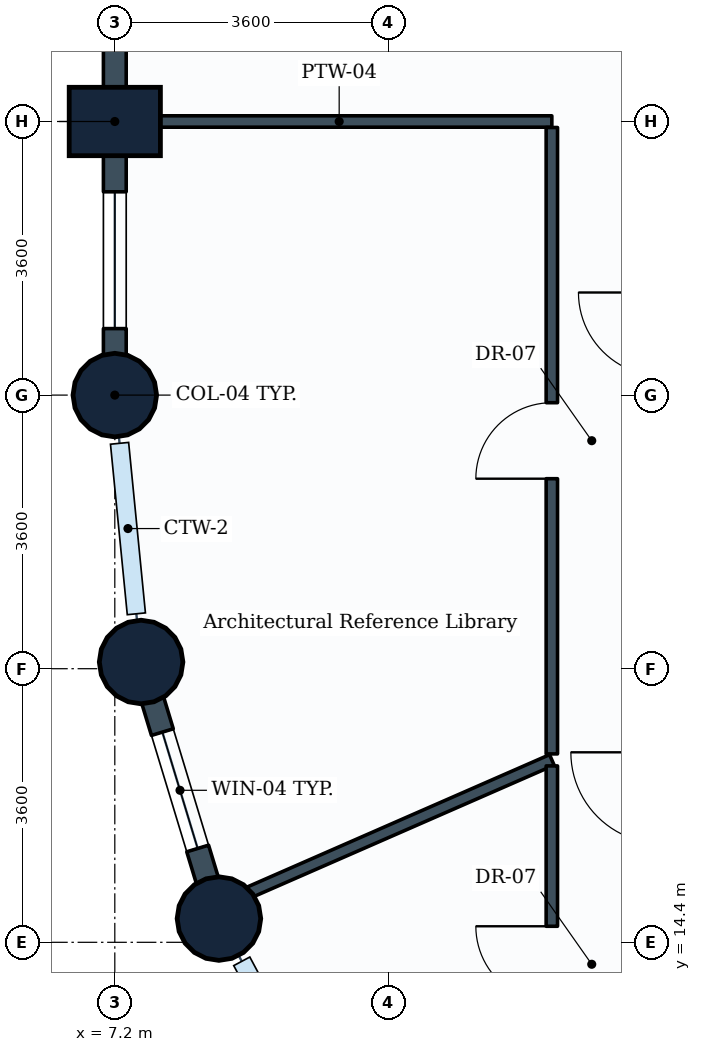
"""IFC4 building model, lengths in metres.
Left out: names, types, materials, properties, quantities, classifications, styles, units other than length and angle.
Written with IfcOpenShell. Run it as: python <this file> out.ifc"""

import sys

from ifc_helpers import new_model, si_unit, direction, frame, frame_2d, origin, origin_2d, place, context, subcontext, project, spatial, rectangle, circle, extrude, element, fill, save


model = new_model("IFC4")
c1 = context("Model", 3, precision=1e-05, world=origin(), true_north=direction((0.0, 1.0)))
c2 = subcontext(c1, "Body", "Model", "MODEL_VIEW")
j1 = project(units=[si_unit("LENGTHUNIT", "METRE"), si_unit("PLANEANGLEUNIT", "RADIAN")], contexts=[c1])
p1 = place(None, origin())
s1 = spatial("IfcSite", under=j1, at=p1, CompositionType="ELEMENT")
p2 = place(p1, origin())
s2 = spatial("IfcBuilding", under=s1, at=p2, CompositionType="ELEMENT")
p3 = place(p2, frame((0.0, 0.0, 39.6)))
s3 = spatial("IfcBuildingStorey", under=s2, at=p3, CompositionType="ELEMENT", Elevation=39.6)
p4 = place(p3, frame((7.2, 21.6, 0.0), z_axis=(0.0, 0.0, 1.0), x_axis=(1.0, 0.0, 0.0)))
e1 = element("IfcColumn", 1, at=p4, inside=s3, PredefinedType="COLUMN", context=c2, shape_type="SweptSolid", body=[
    extrude(circle(Radius=0.55, at=origin_2d()), origin(), (0.0, 0.0, 1.0), 3.9),
])
p5 = place(p3, frame((7.2, 25.2, 0.0), z_axis=(0.0, 0.0, 1.0), x_axis=(0.0, 1.0, 0.0)))
e2 = element("IfcColumn", 2, at=p5, inside=s3, PredefinedType="COLUMN", context=c2, shape_type="SweptSolid", body=[
    extrude(rectangle(XDim=0.9, YDim=1.2, at=origin_2d()), origin(), (0.0, 0.0, 1.0), 3.9),
])
for number, where, z_axis, x_axis in (
    (3, (7.546, 18.088, 0.0), (0.0, 0.0, 1.0), (1.0, 0.0, 0.0)),
    (4, (8.57, 14.712, 0.0), (0.0, 0.0, 1.0), (1.0, 0.0, 0.0)),
):
    element("IfcColumn", number, at=place(p3, frame(where, z_axis=z_axis, x_axis=x_axis)), inside=s3, PredefinedType="COLUMN", context=c2, shape_type="SweptSolid", body=[
        extrude(circle(Radius=0.55, at=origin_2d()), origin(), (0.0, 0.0, 1.0), 3.9),
    ])
p6 = place(p3, frame((7.2, 25.2, 0.0), z_axis=(0.0, 0.0, 1.0), x_axis=(0.0, 1.0, 0.0)))
e5 = element("IfcWall", 5, at=p6, inside=s3, PredefinedType="STANDARD", context=c2, shape_type="SweptSolid", body=[
    extrude(rectangle(XDim=3.6, YDim=0.3, at=frame_2d((1.8, 0.0))), origin(), (0.0, 0.0, 1.0), 2.93),
])
p7 = place(p3, frame((7.2, 21.6, 0.0), z_axis=(0.0, 0.0, 1.0), x_axis=(0.0, 1.0, 0.0)))
e6 = element("IfcWall", 6, at=p7, inside=s3, PredefinedType="STANDARD", context=c2, shape_type="SweptSolid", body=[
    extrude(rectangle(XDim=3.6, YDim=0.3, at=frame_2d((1.8, 0.0))), origin(), (0.0, 0.0, 1.0), 2.93),
])
p8 = place(p7, frame((0.875, 0.0, 0.85)))
e7 = element("IfcOpeningElement", 7, at=p8, cuts=e6, PredefinedType="OPENING", context=c2, shape_type="SweptSolid", body=[
    extrude(rectangle(XDim=1.8, YDim=1.35, at=frame_2d((0.9, 0.675))), frame((0.0, 0.16, 0.0), z_axis=(0.0, -1.0, 0.0), x_axis=(1.0, 0.0, 0.0)), (0.0, 0.0, 1.0), 0.32),
])
p9 = place(p3, frame((8.57, 14.712, 0.0), z_axis=(0.0, 0.0, 1.0), x_axis=(-0.290305086481, 0.956934144423, 0.0)))
e8 = element("IfcWall", 8, at=p9, inside=s3, PredefinedType="STANDARD", context=c2, shape_type="SweptSolid", body=[
    extrude(rectangle(XDim=3.528, YDim=0.3, at=frame_2d((1.764, 0.0))), origin(), (0.0, 0.0, 1.0), 2.93),
])
p10 = place(p9, frame((0.964, 0.0, 0.85)))
e9 = element("IfcOpeningElement", 9, at=p10, cuts=e8, PredefinedType="OPENING", context=c2, shape_type="SweptSolid", body=[
    extrude(rectangle(XDim=1.6, YDim=1.35, at=frame_2d((0.8, 0.675))), frame((0.0, 0.16, 0.0), z_axis=(0.0, -1.0, 0.0), x_axis=(1.0, 0.0, 0.0)), (0.0, 0.0, 1.0), 0.32),
])
p11 = place(p3, frame((7.354, 25.2, 0.0), z_axis=(0.0, 0.0, 1.0), x_axis=(1.0, 0.0, 0.0)))
e10 = element("IfcWall", 10, at=p11, inside=s3, PredefinedType="PARTITIONING", context=c2, shape_type="SweptSolid", body=[
    extrude(rectangle(XDim=5.596, YDim=0.15, at=frame_2d((2.798, 0.0))), origin(), (0.0, 0.0, 1.0), 3.635),
])
p12 = place(p3, frame((12.95, 16.8, 0.0), z_axis=(0.0, 0.0, 1.0), x_axis=(-0.916088262031, -0.400976677837, 0.0)))
e11 = element("IfcWall", 11, at=p12, inside=s3, PredefinedType="PARTITIONING", context=c2, shape_type="SweptSolid", body=[
    extrude(rectangle(XDim=4.706, YDim=0.15, at=frame_2d((2.353, 0.0))), origin(), (0.0, 0.0, 1.0), 2.93),
])
p13 = place(p3, frame((12.95, 16.879, 0.0), z_axis=(0.0, 0.0, 1.0), x_axis=(0.0, 1.0, 0.0)))
e12 = element("IfcWall", 12, at=p13, inside=s3, PredefinedType="PARTITIONING", context=c2, shape_type="SweptSolid", body=[
    extrude(rectangle(XDim=8.242, YDim=0.15, at=frame_2d((4.121, 0.0))), origin(), (0.0, 0.0, 1.0), 3.08),
])
p14 = place(p13, frame((3.621, 0.0, 0.0)))
e13 = element("IfcOpeningElement", 13, at=p14, cuts=e12, PredefinedType="OPENING", context=c2, shape_type="SweptSolid", body=[
    extrude(rectangle(XDim=1.0, YDim=2.1, at=frame_2d((0.5, 1.05))), frame((0.0, 0.085, 0.0), z_axis=(0.0, -1.0, 0.0), x_axis=(1.0, 0.0, 0.0)), (0.0, 0.0, 1.0), 0.17),
])
p15 = place(p3, frame((12.95, 9.35, 0.0), z_axis=(0.0, 0.0, 1.0), x_axis=(0.0, 1.0, 0.0)))
e14 = element("IfcWall", 14, at=p15, inside=s3, PredefinedType="PARTITIONING", context=c2, shape_type="SweptSolid", body=[
    extrude(rectangle(XDim=7.371, YDim=0.15, at=frame_2d((3.686, 0.0))), origin(), (0.0, 0.0, 1.0), 3.04),
])
p16 = place(p15, frame((4.261, 0.0, 0.0)))
e15 = element("IfcOpeningElement", 15, at=p16, cuts=e14, PredefinedType="OPENING", context=c2, shape_type="SweptSolid", body=[
    extrude(rectangle(XDim=1.0, YDim=2.1, at=frame_2d((0.5, 1.05))), frame((0.0, 0.085, 0.0), z_axis=(0.0, -1.0, 0.0), x_axis=(1.0, 0.0, 0.0)), (0.0, 0.0, 1.0), 0.17),
])
p17 = place(p8, origin())
e16 = element("IfcWindow", 16, at=p17, inside=s3, PartitioningType="SINGLE_PANEL", PredefinedType="WINDOW", context=c2, shape_type="SweptSolid", body=[
    extrude(rectangle(XDim=1.8, YDim=1.35, at=frame_2d((0.9, 0.675))), frame((0.0, 0.03, 0.0), z_axis=(0.0, -1.0, 0.0), x_axis=(1.0, 0.0, 0.0)), (0.0, 0.0, 1.0), 0.06),
])
fill(e7, e16)
p18 = place(p10, origin())
e17 = element("IfcWindow", 17, at=p18, inside=s3, PartitioningType="SINGLE_PANEL", PredefinedType="WINDOW", context=c2, shape_type="SweptSolid", body=[
    extrude(rectangle(XDim=1.6, YDim=1.35, at=frame_2d((0.8, 0.675))), frame((0.0, 0.03, 0.0), z_axis=(0.0, -1.0, 0.0), x_axis=(1.0, 0.0, 0.0)), (0.0, 0.0, 1.0), 0.06),
])
fill(e9, e17)
p19 = place(p14, origin())
e18 = element("IfcDoor", 18, at=p19, inside=s3, OperationType="SINGLE_SWING_LEFT", PredefinedType="DOOR", context=c2, shape_type="SweptSolid", body=[
    extrude(rectangle(XDim=1.0, YDim=2.1, at=frame_2d((0.5, 1.05))), frame((0.0, 0.025, 0.0), z_axis=(0.0, -1.0, 0.0), x_axis=(1.0, 0.0, 0.0)), (0.0, 0.0, 1.0), 0.05),
])
fill(e13, e18)
p20 = place(p16, origin())
e19 = element("IfcDoor", 19, at=p20, inside=s3, OperationType="SINGLE_SWING_RIGHT", PredefinedType="DOOR", context=c2, shape_type="SweptSolid", body=[
    extrude(rectangle(XDim=1.0, YDim=2.1, at=frame_2d((0.5, 1.05))), frame((0.0, 0.025, 0.0), z_axis=(0.0, -1.0, 0.0), x_axis=(1.0, 0.0, 0.0)), (0.0, 0.0, 1.0), 0.05),
])
fill(e15, e19)
save(model, sys.argv[1])
